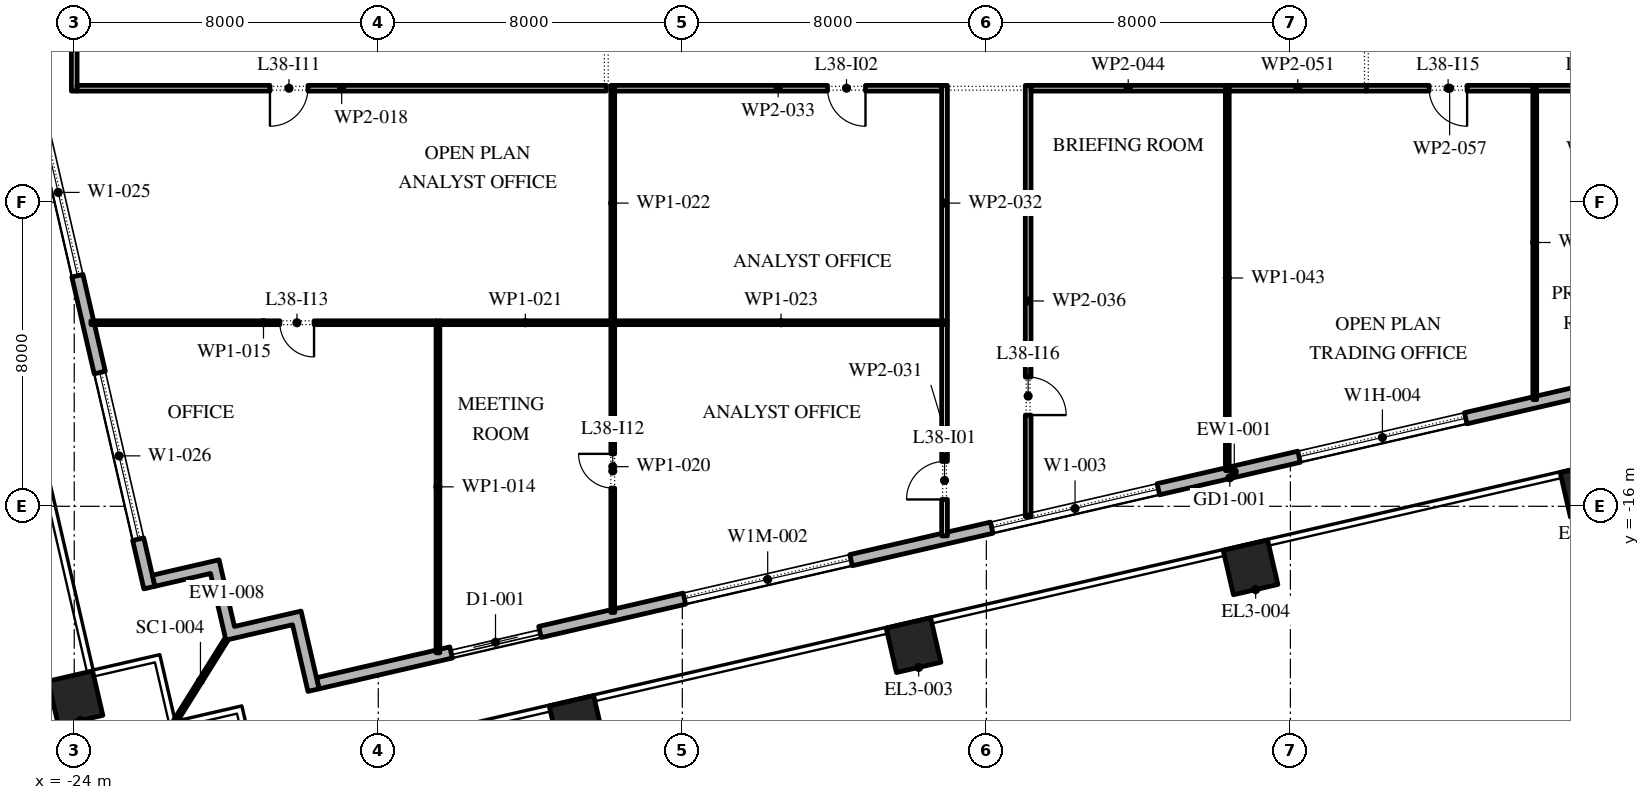
"""IFC4 building model, lengths in metres.
Left out: names, types, materials, properties, quantities, classifications, styles, units other than length and angle.
Written with IfcOpenShell. Run it as: python <this file> out.ifc"""

import sys

from ifc_helpers import new_model, si_unit, direction, frame, frame_2d, origin, origin_2d, place, context, subcontext, project, spatial, polyline, rectangle, outline, extrude, element, fill, save


model = new_model("IFC4")
c1 = context("Model", 3, precision=1e-05, world=origin(), true_north=direction((0.0, 1.0)))
c2 = subcontext(c1, "Body", "Model", "MODEL_VIEW")
j1 = project(units=[si_unit("LENGTHUNIT", "METRE"), si_unit("PLANEANGLEUNIT", "RADIAN")], contexts=[c1])
p1 = place(None, origin())
s1 = spatial("IfcSite", under=j1, at=p1, CompositionType="ELEMENT")
p2 = place(p1, origin())
s2 = spatial("IfcBuilding", under=s1, at=p2, CompositionType="ELEMENT")
p3 = place(p2, frame((0.0, 0.0, 175.8)))
s3 = spatial("IfcBuildingStorey", under=s2, at=p3, CompositionType="ELEMENT", Elevation=175.8)
for number, where, z_axis, x_axis in (
    (1, (-10.782, -21.702, 0.0), (0.0, 0.0, 1.0), (0.974, 0.225, 0.0)),
    (2, (-1.916, -19.655, 0.0), (0.0, 0.0, 1.0), (0.974, 0.225, 0.0)),
    (3, (6.951, -17.608, 0.0), (0.0, 0.0, 1.0), (0.974, 0.225, 0.0)),
    (4, (15.818, -15.561, 0.0), (0.0, 0.0, 1.0), (0.974, 0.225, 0.0)),
    (5, (-23.967, -21.051, 0.0), (0.0, 0.0, 1.0), (0.974, 0.225, 0.0)),
):
    element("IfcColumn", number, at=place(p3, frame(where, z_axis=z_axis, x_axis=x_axis)), inside=s3, PredefinedType="COLUMN", context=c2, shape_type="SweptSolid", body=[
        extrude(rectangle(XDim=1.2, YDim=1.2, at=origin_2d()), origin(), (0.0, 0.0, 1.0), 4.2),
    ])
p4 = place(p3, frame((-17.592, -20.657, 0.0), z_axis=(0.0, 0.0, 1.0), x_axis=(0.974370243697, 0.224950279389, 0.0)))
e6 = element("IfcWall", 6, at=p4, inside=s3, PredefinedType="STANDARD", context=c2, shape_type="SweptSolid", body=[
    extrude(rectangle(XDim=49.5, YDim=0.3, at=frame_2d((24.75, 0.0))), origin(), (0.0, 0.0, 1.0), 4.0),
])
p5 = place(p4, frame((3.6, 0.0, 0.0)))
e7 = element("IfcOpeningElement", 7, at=p5, cuts=e6, PredefinedType="OPENING", context=c2, shape_type="SweptSolid", body=[
    extrude(rectangle(XDim=2.4, YDim=3.5, at=frame_2d((1.2, 1.75))), frame((0.0, 0.16, 0.0), z_axis=(0.0, -1.0, 0.0), x_axis=(1.0, 0.0, 0.0)), (0.0, 0.0, 1.0), 0.32),
])
p6 = place(p4, frame((9.9, 0.0, 0.45)))
e8 = element("IfcOpeningElement", 8, at=p6, cuts=e6, PredefinedType="OPENING", context=c2, shape_type="SweptSolid", body=[
    extrude(rectangle(XDim=4.5, YDim=2.575, at=frame_2d((2.25, 1.288))), frame((0.0, 0.16, 0.0), z_axis=(0.0, -1.0, 0.0), x_axis=(1.0, 0.0, 0.0)), (0.0, 0.0, 1.0), 0.32),
])
p7 = place(p4, frame((18.2, 0.0, 0.45)))
e9 = element("IfcOpeningElement", 9, at=p7, cuts=e6, PredefinedType="OPENING", context=c2, shape_type="SweptSolid", body=[
    extrude(rectangle(XDim=4.5, YDim=3.05, at=frame_2d((2.25, 1.525))), frame((0.0, 0.16, 0.0), z_axis=(0.0, -1.0, 0.0), x_axis=(1.0, 0.0, 0.0)), (0.0, 0.0, 1.0), 0.32),
])
p8 = place(p4, frame((26.5, 0.0, 0.45)))
e10 = element("IfcOpeningElement", 10, at=p8, cuts=e6, PredefinedType="OPENING", context=c2, shape_type="SweptSolid", body=[
    extrude(rectangle(XDim=4.5, YDim=2.75, at=frame_2d((2.25, 1.375))), frame((0.0, 0.16, 0.0), z_axis=(0.0, -1.0, 0.0), x_axis=(1.0, 0.0, 0.0)), (0.0, 0.0, 1.0), 0.32),
])
p9 = place(p4, frame((36.8, 0.0, 0.0)))
e11 = element("IfcOpeningElement", 11, at=p9, cuts=e6, PredefinedType="OPENING", context=c2, shape_type="SweptSolid", body=[
    extrude(rectangle(XDim=2.4, YDim=3.275, at=frame_2d((1.2, 1.637))), frame((0.0, 0.16, 0.0), z_axis=(0.0, -1.0, 0.0), x_axis=(1.0, 0.0, 0.0)), (0.0, 0.0, 1.0), 0.32),
])
p10 = place(p4, frame((43.1, 0.0, 0.45)))
e12 = element("IfcOpeningElement", 12, at=p10, cuts=e6, PredefinedType="OPENING", context=c2, shape_type="SweptSolid", body=[
    extrude(rectangle(XDim=4.5, YDim=2.875, at=frame_2d((2.25, 1.438))), frame((0.0, 0.16, 0.0), z_axis=(0.0, -1.0, 0.0), x_axis=(1.0, 0.0, 0.0)), (0.0, 0.0, 1.0), 0.32),
])
p11 = place(p3, frame((-33.157, 30.092, 0.0), z_axis=(0.0, 0.0, 1.0), x_axis=(0.224950279389, -0.974370243697, 0.0)))
e13 = element("IfcWall", 13, at=p11, inside=s3, PredefinedType="STANDARD", context=c2, shape_type="SweptSolid", body=[
    extrude(rectangle(XDim=49.5, YDim=0.3, at=frame_2d((24.75, 0.0))), origin(), (0.0, 0.0, 1.0), 4.0),
])
p12 = place(p11, frame((2.207, 0.0, 0.0)))
e14 = element("IfcOpeningElement", 14, at=p12, cuts=e13, PredefinedType="OPENING", context=c2, shape_type="SweptSolid", body=[
    extrude(rectangle(XDim=2.4, YDim=3.5, at=frame_2d((1.2, 1.75))), frame((0.0, 0.16, 0.0), z_axis=(0.0, -1.0, 0.0), x_axis=(1.0, 0.0, 0.0)), (0.0, 0.0, 1.0), 0.32),
])
p13 = place(p11, frame((8.121, 0.0, 0.45)))
e15 = element("IfcOpeningElement", 15, at=p13, cuts=e13, PredefinedType="OPENING", context=c2, shape_type="SweptSolid", body=[
    extrude(rectangle(XDim=4.5, YDim=2.825, at=frame_2d((2.25, 1.413))), frame((0.0, 0.16, 0.0), z_axis=(0.0, -1.0, 0.0), x_axis=(1.0, 0.0, 0.0)), (0.0, 0.0, 1.0), 0.32),
])
p14 = place(p11, frame((15.236, 0.0, 0.45)))
e16 = element("IfcOpeningElement", 16, at=p14, cuts=e13, PredefinedType="OPENING", context=c2, shape_type="SweptSolid", body=[
    extrude(rectangle(XDim=4.5, YDim=2.95, at=frame_2d((2.25, 1.475))), frame((0.0, 0.16, 0.0), z_axis=(0.0, -1.0, 0.0), x_axis=(1.0, 0.0, 0.0)), (0.0, 0.0, 1.0), 0.32),
])
p15 = place(p11, frame((22.35, 0.0, 0.45)))
e17 = element("IfcOpeningElement", 17, at=p15, cuts=e13, PredefinedType="OPENING", context=c2, shape_type="SweptSolid", body=[
    extrude(rectangle(XDim=4.5, YDim=3.0, at=frame_2d((2.25, 1.5))), frame((0.0, 0.16, 0.0), z_axis=(0.0, -1.0, 0.0), x_axis=(1.0, 0.0, 0.0)), (0.0, 0.0, 1.0), 0.32),
])
p16 = place(p11, frame((30.514, 0.0, 0.0)))
e18 = element("IfcOpeningElement", 18, at=p16, cuts=e13, PredefinedType="OPENING", context=c2, shape_type="SweptSolid", body=[
    extrude(rectangle(XDim=2.4, YDim=3.5, at=frame_2d((1.2, 1.75))), frame((0.0, 0.16, 0.0), z_axis=(0.0, -1.0, 0.0), x_axis=(1.0, 0.0, 0.0)), (0.0, 0.0, 1.0), 0.32),
])
p17 = place(p11, frame((36.579, 0.0, 0.45)))
e19 = element("IfcOpeningElement", 19, at=p17, cuts=e13, PredefinedType="OPENING", context=c2, shape_type="SweptSolid", body=[
    extrude(rectangle(XDim=4.5, YDim=3.05, at=frame_2d((2.25, 1.525))), frame((0.0, 0.16, 0.0), z_axis=(0.0, -1.0, 0.0), x_axis=(1.0, 0.0, 0.0)), (0.0, 0.0, 1.0), 0.32),
])
p18 = place(p11, frame((43.693, 0.0, 0.45)))
e20 = element("IfcOpeningElement", 20, at=p18, cuts=e13, PredefinedType="OPENING", context=c2, shape_type="SweptSolid", body=[
    extrude(rectangle(XDim=4.5, YDim=3.05, at=frame_2d((2.25, 1.525))), frame((0.0, 0.16, 0.0), z_axis=(0.0, -1.0, 0.0), x_axis=(1.0, 0.0, 0.0)), (0.0, 0.0, 1.0), 0.32),
])
p19 = place(p3, origin())
e21 = element("IfcWall", 21, at=p19, inside=s3, PredefinedType="STANDARD", context=c2, shape_type="SweptSolid", body=[
    extrude(outline(polyline([(-18.256, -19.117), (-20.01, -19.522), (-20.414, -17.768), (-21.876, -18.105), (-21.943, -17.813), (-20.19, -17.408), (-19.785, -19.162), (-18.031, -18.757), (-17.558, -20.803), (-17.851, -20.871), (-18.256, -19.117)])), origin(), (0.0, 0.0, 1.0), 4.0),
])
p20 = place(p3, frame((-20.01, -19.522, -0.05), z_axis=(0.0, 0.0, 1.0), x_axis=(-0.529920736377, -0.848047176257, 0.0)))
e22 = element("IfcWall", 22, at=p20, inside=s3, PredefinedType="STANDARD", context=c2, shape_type="SweptSolid", body=[
    extrude(rectangle(XDim=2.526, YDim=0.1, at=frame_2d((1.263, 0.0))), origin(), (0.0, 0.0, 1.0), 4.05),
])
p21 = place(p3, frame((-24.0, -5.075, 0.0), z_axis=(0.0, 0.0, 1.0), x_axis=(0.0, 1.0, 0.0)))
e23 = element("IfcWall", 23, at=p21, inside=s3, PredefinedType="PARTITIONING", context=c2, shape_type="SweptSolid", body=[
    extrude(rectangle(XDim=7.815, YDim=0.15, at=frame_2d((3.907, 0.0))), origin(), (0.0, 0.0, 1.0), 4.0),
])
p22 = place(p3, frame((-14.43, -19.856, 0.0), z_axis=(0.0, 0.0, 1.0), x_axis=(0.0, 1.0, 0.0)))
e24 = element("IfcWall", 24, at=p22, inside=s3, PredefinedType="PARTITIONING", context=c2, shape_type="SweptSolid", body=[
    extrude(rectangle(XDim=8.736, YDim=0.1, at=frame_2d((4.368, 0.0))), origin(), (0.0, 0.0, 1.0), 4.0),
])
p23 = place(p3, frame((-14.48, -11.17, 0.0), z_axis=(0.0, 0.0, 1.0), x_axis=(-1.0, 0.0, 0.0)))
e25 = element("IfcWall", 25, at=p23, inside=s3, PredefinedType="PARTITIONING", context=c2, shape_type="SweptSolid", body=[
    extrude(rectangle(XDim=9.08, YDim=0.1, at=frame_2d((4.54, 0.0))), origin(), (0.0, 0.0, 1.0), 4.0),
])
p24 = place(p23, frame((3.21, 0.0, 0.0)))
e26 = element("IfcOpeningElement", 26, at=p24, cuts=e25, PredefinedType="OPENING", context=c2, shape_type="SweptSolid", body=[
    extrude(rectangle(XDim=0.9, YDim=2.1, at=frame_2d((0.45, 1.05))), frame((0.0, 0.06, 0.0), z_axis=(0.0, -1.0, 0.0), x_axis=(1.0, 0.0, 0.0)), (0.0, 0.0, 1.0), 0.12),
])
p25 = place(p3, frame((-10.0, -5.0, 0.0), z_axis=(0.0, 0.0, 1.0), x_axis=(-1.0, 0.0, 0.0)))
e27 = element("IfcWall", 27, at=p25, inside=s3, PredefinedType="PARTITIONING", context=c2, shape_type="SweptSolid", body=[
    extrude(rectangle(XDim=13.925, YDim=0.15, at=frame_2d((6.962, 0.0))), origin(), (0.0, 0.0, 1.0), 4.0),
])
p26 = place(p25, frame((7.85, 0.0, 0.0)))
e28 = element("IfcOpeningElement", 28, at=p26, cuts=e27, PredefinedType="OPENING", context=c2, shape_type="SweptSolid", body=[
    extrude(rectangle(XDim=1.0, YDim=2.1, at=frame_2d((0.5, 1.05))), frame((0.0, 0.085, 0.0), z_axis=(0.0, -1.0, 0.0), x_axis=(1.0, 0.0, 0.0)), (0.0, 0.0, 1.0), 0.17),
])
p27 = place(p3, frame((-9.83, -18.794, 0.0), z_axis=(0.0, 0.0, 1.0), x_axis=(0.0, 1.0, 0.0)))
e29 = element("IfcWall", 29, at=p27, inside=s3, PredefinedType="PARTITIONING", context=c2, shape_type="SweptSolid", body=[
    extrude(rectangle(XDim=7.674, YDim=0.1, at=frame_2d((3.837, 0.0))), origin(), (0.0, 0.0, 1.0), 4.0),
])
p28 = place(p27, frame((3.274, 0.0, 0.0)))
e30 = element("IfcOpeningElement", 30, at=p28, cuts=e29, PredefinedType="OPENING", context=c2, shape_type="SweptSolid", body=[
    extrude(rectangle(XDim=0.9, YDim=2.1, at=frame_2d((0.45, 1.05))), frame((0.0, 0.06, 0.0), z_axis=(0.0, -1.0, 0.0), x_axis=(1.0, 0.0, 0.0)), (0.0, 0.0, 1.0), 0.12),
])
p29 = place(p3, frame((-9.88, -11.17, 0.0), z_axis=(0.0, 0.0, 1.0), x_axis=(-1.0, 0.0, 0.0)))
e31 = element("IfcWall", 31, at=p29, inside=s3, PredefinedType="PARTITIONING", context=c2, shape_type="SweptSolid", body=[
    extrude(rectangle(XDim=4.5, YDim=0.1, at=frame_2d((2.25, 0.0))), origin(), (0.0, 0.0, 1.0), 4.0),
])
p30 = place(p3, frame((-9.83, -11.12, 0.0), z_axis=(0.0, 0.0, 1.0), x_axis=(0.0, 1.0, 0.0)))
e32 = element("IfcWall", 32, at=p30, inside=s3, PredefinedType="PARTITIONING", context=c2, shape_type="SweptSolid", body=[
    extrude(rectangle(XDim=6.195, YDim=0.1, at=frame_2d((3.098, 0.0))), origin(), (0.0, 0.0, 1.0), 4.0),
])
p31 = place(p3, frame((-9.78, -11.17, 0.0), z_axis=(0.0, 0.0, 1.0), x_axis=(1.0, 0.0, 0.0)))
e33 = element("IfcWall", 33, at=p31, inside=s3, PredefinedType="PARTITIONING", context=c2, shape_type="SweptSolid", body=[
    extrude(rectangle(XDim=8.755, YDim=0.1, at=frame_2d((4.377, 0.0))), origin(), (0.0, 0.0, 1.0), 4.0),
])
p32 = place(p3, frame((-1.1, -16.778, 0.0), z_axis=(0.0, 0.0, 1.0), x_axis=(0.0, 1.0, 0.0)))
e34 = element("IfcWall", 34, at=p32, inside=s3, PredefinedType="PARTITIONING", context=c2, shape_type="SweptSolid", body=[
    extrude(rectangle(XDim=5.558, YDim=0.15, at=frame_2d((2.779, 0.0))), origin(), (0.0, 0.0, 1.0), 4.0),
])
p33 = place(p32, frame((0.958, 0.0, 0.0)))
e35 = element("IfcOpeningElement", 35, at=p33, cuts=e34, PredefinedType="OPENING", context=c2, shape_type="SweptSolid", body=[
    extrude(rectangle(XDim=1.0, YDim=2.1, at=frame_2d((0.5, 1.05))), frame((0.0, 0.085, 0.0), z_axis=(0.0, -1.0, 0.0), x_axis=(1.0, 0.0, 0.0)), (0.0, 0.0, 1.0), 0.17),
])
p34 = place(p3, frame((-1.1, -11.12, 0.0), z_axis=(0.0, 0.0, 1.0), x_axis=(0.0, 1.0, 0.0)))
e36 = element("IfcWall", 36, at=p34, inside=s3, PredefinedType="PARTITIONING", context=c2, shape_type="SweptSolid", body=[
    extrude(rectangle(XDim=6.195, YDim=0.15, at=frame_2d((3.098, 0.0))), origin(), (0.0, 0.0, 1.0), 4.0),
])
p35 = place(p3, frame((-1.175, -5.0, 0.0), z_axis=(0.0, 0.0, 1.0), x_axis=(-1.0, 0.0, 0.0)))
e37 = element("IfcWall", 37, at=p35, inside=s3, PredefinedType="PARTITIONING", context=c2, shape_type="SweptSolid", body=[
    extrude(rectangle(XDim=8.605, YDim=0.15, at=frame_2d((4.302, 0.0))), origin(), (0.0, 0.0, 1.0), 4.0),
])
p36 = place(p35, frame((2.005, 0.0, 0.0)))
e38 = element("IfcOpeningElement", 38, at=p36, cuts=e37, PredefinedType="OPENING", context=c2, shape_type="SweptSolid", body=[
    extrude(rectangle(XDim=1.0, YDim=2.1, at=frame_2d((0.5, 1.05))), frame((0.0, 0.085, 0.0), z_axis=(0.0, -1.0, 0.0), x_axis=(1.0, 0.0, 0.0)), (0.0, 0.0, 1.0), 0.17),
])
p37 = place(p3, frame((1.1, -4.925, 0.0), z_axis=(0.0, 0.0, 1.0), x_axis=(0.0, -1.0, 0.0)))
e39 = element("IfcWall", 39, at=p37, inside=s3, PredefinedType="PARTITIONING", context=c2, shape_type="SweptSolid", body=[
    extrude(rectangle(XDim=11.345, YDim=0.15, at=frame_2d((5.672, 0.0))), origin(), (0.0, 0.0, 1.0), 4.0),
])
p38 = place(p37, frame((7.675, 0.0, 0.0)))
e40 = element("IfcOpeningElement", 40, at=p38, cuts=e39, PredefinedType="OPENING", context=c2, shape_type="SweptSolid", body=[
    extrude(rectangle(XDim=1.0, YDim=2.1, at=frame_2d((0.5, 1.05))), frame((0.0, 0.085, 0.0), z_axis=(0.0, -1.0, 0.0), x_axis=(1.0, 0.0, 0.0)), (0.0, 0.0, 1.0), 0.17),
])
p39 = place(p3, frame((6.34, -15.061, 0.0), z_axis=(0.0, 0.0, 1.0), x_axis=(0.0, 1.0, 0.0)))
e41 = element("IfcWall", 41, at=p39, inside=s3, PredefinedType="PARTITIONING", context=c2, shape_type="SweptSolid", body=[
    extrude(rectangle(XDim=10.136, YDim=0.1, at=frame_2d((5.068, 0.0))), origin(), (0.0, 0.0, 1.0), 4.0),
])
p40 = place(p3, frame((6.29, -5.0, 0.0), z_axis=(0.0, 0.0, 1.0), x_axis=(-1.0, 0.0, 0.0)))
e42 = element("IfcWall", 42, at=p40, inside=s3, PredefinedType="PARTITIONING", context=c2, shape_type="SweptSolid", body=[
    extrude(rectangle(XDim=5.115, YDim=0.15, at=frame_2d((2.558, 0.0))), origin(), (0.0, 0.0, 1.0), 4.0),
])
p41 = place(p3, frame((10.0, -5.0, 0.0), z_axis=(0.0, 0.0, 1.0), x_axis=(-1.0, 0.0, 0.0)))
e43 = element("IfcWall", 43, at=p41, inside=s3, PredefinedType="PARTITIONING", context=c2, shape_type="SweptSolid", body=[
    extrude(rectangle(XDim=3.61, YDim=0.15, at=frame_2d((1.805, 0.0))), origin(), (0.0, 0.0, 1.0), 4.0),
])
p42 = place(p3, frame((14.43, -13.193, 0.0), z_axis=(0.0, 0.0, 1.0), x_axis=(0.0, 1.0, 0.0)))
e44 = element("IfcWall", 44, at=p42, inside=s3, PredefinedType="PARTITIONING", context=c2, shape_type="SweptSolid", body=[
    extrude(rectangle(XDim=8.268, YDim=0.1, at=frame_2d((4.134, 0.0))), origin(), (0.0, 0.0, 1.0), 4.0),
])
p43 = place(p3, frame((14.38, -5.0, 0.0), z_axis=(0.0, 0.0, 1.0), x_axis=(-1.0, 0.0, 0.0)))
e45 = element("IfcWall", 45, at=p43, inside=s3, PredefinedType="PARTITIONING", context=c2, shape_type="SweptSolid", body=[
    extrude(rectangle(XDim=4.38, YDim=0.15, at=frame_2d((2.19, 0.0))), origin(), (0.0, 0.0, 1.0), 4.0),
])
p44 = place(p43, frame((1.73, 0.0, 0.0)))
e46 = element("IfcOpeningElement", 46, at=p44, cuts=e45, PredefinedType="OPENING", context=c2, shape_type="SweptSolid", body=[
    extrude(rectangle(XDim=1.0, YDim=2.1, at=frame_2d((0.5, 1.05))), frame((0.0, 0.085, 0.0), z_axis=(0.0, -1.0, 0.0), x_axis=(1.0, 0.0, 0.0)), (0.0, 0.0, 1.0), 0.17),
])
p45 = place(p3, frame((17.97, -5.0, 0.0), z_axis=(0.0, 0.0, 1.0), x_axis=(-1.0, 0.0, 0.0)))
e47 = element("IfcWall", 47, at=p45, inside=s3, PredefinedType="PARTITIONING", context=c2, shape_type="SweptSolid", body=[
    extrude(rectangle(XDim=3.49, YDim=0.15, at=frame_2d((1.745, 0.0))), origin(), (0.0, 0.0, 1.0), 4.0),
])
p46 = place(p45, frame((1.39, 0.0, 0.0)))
e48 = element("IfcOpeningElement", 48, at=p46, cuts=e47, PredefinedType="OPENING", context=c2, shape_type="SweptSolid", body=[
    extrude(rectangle(XDim=1.0, YDim=2.1, at=frame_2d((0.5, 1.05))), frame((0.0, 0.085, 0.0), z_axis=(0.0, -1.0, 0.0), x_axis=(1.0, 0.0, 0.0)), (0.0, 0.0, 1.0), 0.17),
])
p47 = place(p5, origin())
e49 = element("IfcDoor", 49, at=p47, inside=s3, OperationType="DOUBLE_DOOR_SLIDING", PredefinedType="DOOR", context=c2, shape_type="SweptSolid", body=[
    extrude(rectangle(XDim=2.4, YDim=3.5, at=frame_2d((1.2, 1.75))), frame((0.0, 0.025, 0.0), z_axis=(0.0, -1.0, 0.0), x_axis=(1.0, 0.0, 0.0)), (0.0, 0.0, 1.0), 0.05),
])
fill(e7, e49)
p48 = place(p6, origin())
e50 = element("IfcWindow", 50, at=p48, inside=s3, PartitioningType="DOUBLE_PANEL_VERTICAL", PredefinedType="WINDOW", context=c2, shape_type="SweptSolid", body=[
    extrude(rectangle(XDim=4.5, YDim=2.575, at=frame_2d((2.25, 1.288))), frame((0.0, 0.03, 0.0), z_axis=(0.0, -1.0, 0.0), x_axis=(1.0, 0.0, 0.0)), (0.0, 0.0, 1.0), 0.06),
])
fill(e8, e50)
p49 = place(p7, origin())
e51 = element("IfcWindow", 51, at=p49, inside=s3, PartitioningType="DOUBLE_PANEL_VERTICAL", PredefinedType="WINDOW", context=c2, shape_type="SweptSolid", body=[
    extrude(rectangle(XDim=4.5, YDim=3.05, at=frame_2d((2.25, 1.525))), frame((0.0, 0.03, 0.0), z_axis=(0.0, -1.0, 0.0), x_axis=(1.0, 0.0, 0.0)), (0.0, 0.0, 1.0), 0.06),
])
fill(e9, e51)
p50 = place(p8, origin())
e52 = element("IfcWindow", 52, at=p50, inside=s3, PartitioningType="DOUBLE_PANEL_VERTICAL", PredefinedType="WINDOW", context=c2, shape_type="SweptSolid", body=[
    extrude(rectangle(XDim=4.5, YDim=2.75, at=frame_2d((2.25, 1.375))), frame((0.0, 0.03, 0.0), z_axis=(0.0, -1.0, 0.0), x_axis=(1.0, 0.0, 0.0)), (0.0, 0.0, 1.0), 0.06),
])
fill(e10, e52)
p51 = place(p17, origin())
e53 = element("IfcWindow", 53, at=p51, inside=s3, PartitioningType="DOUBLE_PANEL_VERTICAL", PredefinedType="WINDOW", context=c2, shape_type="SweptSolid", body=[
    extrude(rectangle(XDim=4.5, YDim=3.05, at=frame_2d((2.25, 1.525))), frame((0.0, 0.03, 0.0), z_axis=(0.0, -1.0, 0.0), x_axis=(1.0, 0.0, 0.0)), (0.0, 0.0, 1.0), 0.06),
])
fill(e19, e53)
p52 = place(p18, origin())
e54 = element("IfcWindow", 54, at=p52, inside=s3, PartitioningType="DOUBLE_PANEL_VERTICAL", PredefinedType="WINDOW", context=c2, shape_type="SweptSolid", body=[
    extrude(rectangle(XDim=4.5, YDim=3.05, at=frame_2d((2.25, 1.525))), frame((0.0, 0.03, 0.0), z_axis=(0.0, -1.0, 0.0), x_axis=(1.0, 0.0, 0.0)), (0.0, 0.0, 1.0), 0.06),
])
fill(e20, e54)
p53 = place(p33, origin())
e55 = element("IfcDoor", 55, at=p53, inside=s3, OperationType="SINGLE_SWING_RIGHT", PredefinedType="DOOR", context=c2, shape_type="SweptSolid", body=[
    extrude(rectangle(XDim=1.0, YDim=2.1, at=frame_2d((0.5, 1.05))), frame((0.0, 0.025, 0.0), z_axis=(0.0, -1.0, 0.0), x_axis=(1.0, 0.0, 0.0)), (0.0, 0.0, 1.0), 0.05),
])
fill(e35, e55)
p54 = place(p36, origin())
e56 = element("IfcDoor", 56, at=p54, inside=s3, OperationType="SINGLE_SWING_RIGHT", PredefinedType="DOOR", context=c2, shape_type="SweptSolid", body=[
    extrude(rectangle(XDim=1.0, YDim=2.1, at=frame_2d((0.5, 1.05))), frame((0.0, 0.025, 0.0), z_axis=(0.0, -1.0, 0.0), x_axis=(1.0, 0.0, 0.0)), (0.0, 0.0, 1.0), 0.05),
])
fill(e38, e56)
p55 = place(p26, origin())
e57 = element("IfcDoor", 57, at=p55, inside=s3, OperationType="SINGLE_SWING_LEFT", PredefinedType="DOOR", context=c2, shape_type="SweptSolid", body=[
    extrude(rectangle(XDim=1.0, YDim=2.1, at=frame_2d((0.5, 1.05))), frame((0.0, 0.025, 0.0), z_axis=(0.0, -1.0, 0.0), x_axis=(1.0, 0.0, 0.0)), (0.0, 0.0, 1.0), 0.05),
])
fill(e28, e57)
p56 = place(p28, origin())
e58 = element("IfcDoor", 58, at=p56, inside=s3, OperationType="SINGLE_SWING_LEFT", PredefinedType="DOOR", context=c2, shape_type="SweptSolid", body=[
    extrude(rectangle(XDim=0.9, YDim=2.1, at=frame_2d((0.45, 1.05))), frame((0.0, 0.025, 0.0), z_axis=(0.0, -1.0, 0.0), x_axis=(1.0, 0.0, 0.0)), (0.0, 0.0, 1.0), 0.05),
])
fill(e30, e58)
p57 = place(p24, origin())
e59 = element("IfcDoor", 59, at=p57, inside=s3, OperationType="SINGLE_SWING_RIGHT", PredefinedType="DOOR", context=c2, shape_type="SweptSolid", body=[
    extrude(rectangle(XDim=0.9, YDim=2.1, at=frame_2d((0.45, 1.05))), frame((0.0, 0.025, 0.0), z_axis=(0.0, -1.0, 0.0), x_axis=(1.0, 0.0, 0.0)), (0.0, 0.0, 1.0), 0.05),
])
fill(e26, e59)
p58 = place(p44, origin())
e60 = element("IfcDoor", 60, at=p58, inside=s3, OperationType="SINGLE_SWING_RIGHT", PredefinedType="DOOR", context=c2, shape_type="SweptSolid", body=[
    extrude(rectangle(XDim=1.0, YDim=2.1, at=frame_2d((0.5, 1.05))), frame((0.0, 0.025, 0.0), z_axis=(0.0, -1.0, 0.0), x_axis=(1.0, 0.0, 0.0)), (0.0, 0.0, 1.0), 0.05),
])
fill(e46, e60)
p59 = place(p38, origin())
e61 = element("IfcDoor", 61, at=p59, inside=s3, OperationType="SINGLE_SWING_LEFT", PredefinedType="DOOR", context=c2, shape_type="SweptSolid", body=[
    extrude(rectangle(XDim=1.0, YDim=2.1, at=frame_2d((0.5, 1.05))), frame((0.0, 0.025, 0.0), z_axis=(0.0, -1.0, 0.0), x_axis=(1.0, 0.0, 0.0)), (0.0, 0.0, 1.0), 0.05),
])
fill(e40, e61)
save(model, sys.argv[1])
